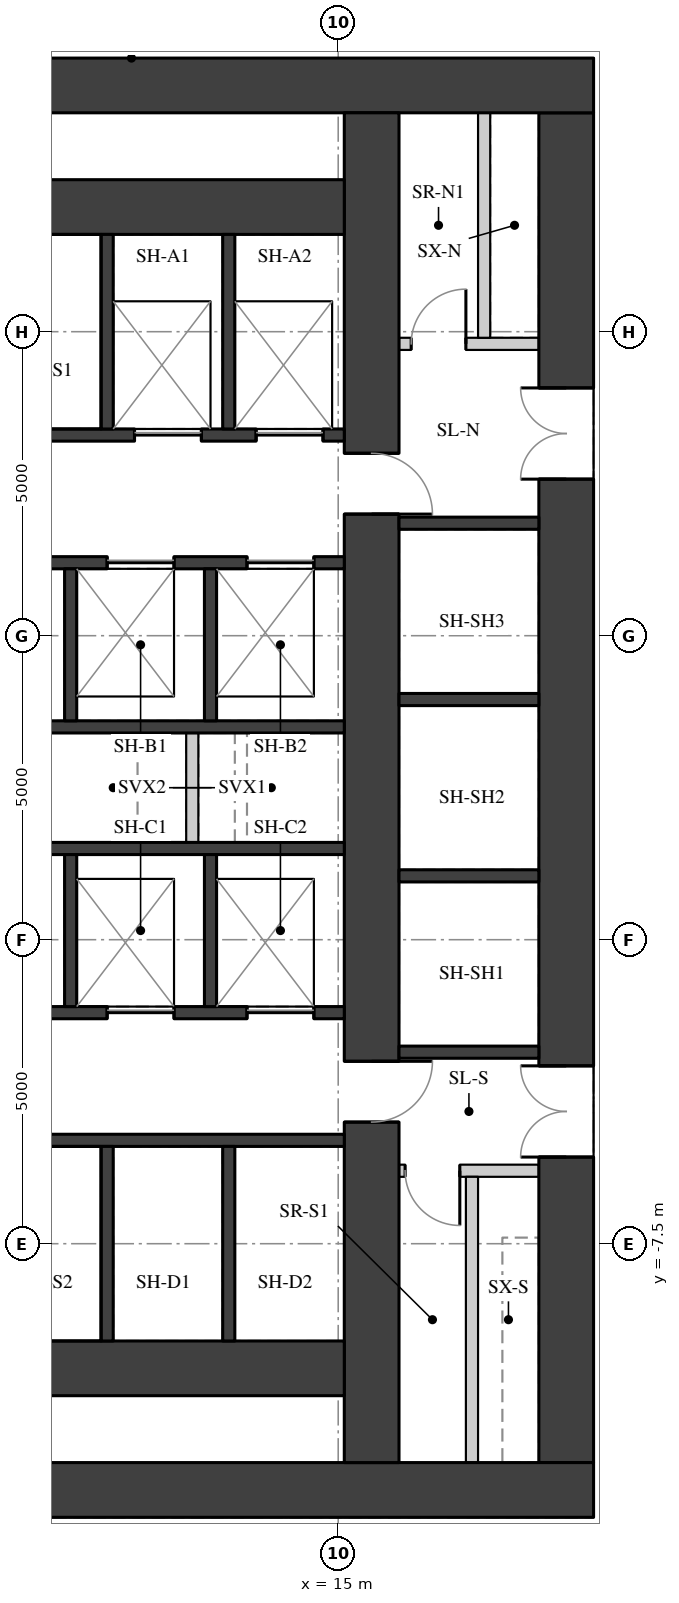
"""IFC4 building model, lengths in metres.
Left out: names, types, materials, properties, quantities, classifications, styles, units other than length and angle.
Written with IfcOpenShell. Run it as: python <this file> out.ifc"""

import sys

from ifc_helpers import new_model, si_unit, direction, frame, frame_2d, origin, place, context, subcontext, project, spatial, rectangle, extrude, element, fill, save


model = new_model("IFC4")
c1 = context("Model", 3, precision=1e-05, world=origin(), true_north=direction((0.0, 1.0)))
c2 = subcontext(c1, "Body", "Model", "MODEL_VIEW")
j1 = project(units=[si_unit("LENGTHUNIT", "METRE"), si_unit("PLANEANGLEUNIT", "RADIAN")], contexts=[c1])
p1 = place(None, origin())
s1 = spatial("IfcSite", under=j1, at=p1, CompositionType="ELEMENT")
p2 = place(p1, origin())
s2 = spatial("IfcBuilding", under=s1, at=p2, CompositionType="ELEMENT")
p3 = place(p2, frame((0.0, 0.0, 88.9)))
s3 = spatial("IfcBuildingStorey", under=s2, at=p3, CompositionType="ELEMENT", Elevation=88.9)
p4 = place(p3, frame((18.75, -11.1, 0.0), z_axis=(0.0, 0.0, 1.0), x_axis=(0.0, 1.0, 0.0)))
e1 = element("IfcWall", 1, at=p4, inside=s3, PredefinedType="SHEAR", context=c2, shape_type="SweptSolid", body=[
    extrude(rectangle(XDim=22.2, YDim=0.9, at=frame_2d((11.1, 0.0))), origin(), (0.0, 0.0, 1.0), 3.02),
])
p5 = place(p4, frame((16.175, 0.0, 0.0)))
e2 = element("IfcOpeningElement", 2, at=p5, cuts=e1, PredefinedType="OPENING", context=c2, shape_type="SweptSolid", body=[
    extrude(rectangle(XDim=1.5, YDim=2.1, at=frame_2d((0.75, 1.05))), frame((0.0, 0.46, 0.0), z_axis=(0.0, -1.0, 0.0), x_axis=(1.0, 0.0, 0.0)), (0.0, 0.0, 1.0), 0.92),
])
p6 = place(p4, frame((5.025, 0.0, 0.0)))
e3 = element("IfcOpeningElement", 3, at=p6, cuts=e1, PredefinedType="OPENING", context=c2, shape_type="SweptSolid", body=[
    extrude(rectangle(XDim=1.5, YDim=2.1, at=frame_2d((0.75, 1.05))), frame((0.0, 0.46, 0.0), z_axis=(0.0, -1.0, 0.0), x_axis=(1.0, 0.0, 0.0)), (0.0, 0.0, 1.0), 0.92),
])
for number, where, z_axis, x_axis in (
    (4, (4.0, 11.55, 0.0), (0.0, 0.0, 1.0), (1.0, 0.0, 0.0)),
    (5, (4.0, -11.55, 0.0), (0.0, 0.0, 1.0), (1.0, 0.0, 0.0)),
):
    element("IfcWall", number, at=place(p3, frame(where, z_axis=z_axis, x_axis=x_axis)), inside=s3, PredefinedType="SHEAR", context=c2, shape_type="SweptSolid", body=[
        extrude(rectangle(XDim=15.2, YDim=0.9, at=frame_2d((7.6, 0.0))), origin(), (0.0, 0.0, 1.0), 3.02),
    ])
p7 = place(p3, frame((15.55, -11.1, 0.0), z_axis=(0.0, 0.0, 1.0), x_axis=(0.0, 1.0, 0.0)))
e6 = element("IfcWall", 6, at=p7, inside=s3, PredefinedType="SHEAR", context=c2, shape_type="SweptSolid", body=[
    extrude(rectangle(XDim=22.2, YDim=0.9, at=frame_2d((11.1, 0.0))), origin(), (0.0, 0.0, 1.0), 3.02),
])
p8 = place(p7, frame((15.6, 0.0, 0.0)))
e7 = element("IfcOpeningElement", 7, at=p8, cuts=e6, PredefinedType="OPENING", context=c2, shape_type="SweptSolid", body=[
    extrude(rectangle(XDim=1.0, YDim=2.1, at=frame_2d((0.5, 1.05))), frame((0.0, 0.46, 0.0), z_axis=(0.0, -1.0, 0.0), x_axis=(1.0, 0.0, 0.0)), (0.0, 0.0, 1.0), 0.92),
])
p9 = place(p7, frame((5.6, 0.0, 0.0)))
e8 = element("IfcOpeningElement", 8, at=p9, cuts=e6, PredefinedType="OPENING", context=c2, shape_type="SweptSolid", body=[
    extrude(rectangle(XDim=1.0, YDim=2.1, at=frame_2d((0.5, 1.05))), frame((0.0, 0.46, 0.0), z_axis=(0.0, -1.0, 0.0), x_axis=(1.0, 0.0, 0.0)), (0.0, 0.0, 1.0), 0.92),
])
for number, where, z_axis, x_axis in (
    (9, (4.9, 9.55, 0.0), (0.0, 0.0, 1.0), (1.0, 0.0, 0.0)),
    (10, (4.9, -9.55, 0.0), (0.0, 0.0, 1.0), (1.0, 0.0, 0.0)),
):
    element("IfcWall", number, at=place(p3, frame(where, z_axis=z_axis, x_axis=x_axis)), inside=s3, PredefinedType="SHEAR", context=c2, shape_type="SweptSolid", body=[
        extrude(rectangle(XDim=10.2, YDim=0.9, at=frame_2d((5.1, 0.0))), origin(), (0.0, 0.0, 1.0), 3.02),
    ])
p10 = place(p3, frame((4.9, 5.8, 0.0), z_axis=(0.0, 0.0, 1.0), x_axis=(1.0, 0.0, 0.0)))
e11 = element("IfcWall", 11, at=p10, inside=s3, PredefinedType="SHEAR", context=c2, shape_type="SweptSolid", body=[
    extrude(rectangle(XDim=10.2, YDim=0.2, at=frame_2d((5.1, 0.0))), origin(), (0.0, 0.0, 1.0), 3.02),
])
p11 = place(p10, frame((6.75, 0.0, 0.0)))
e12 = element("IfcOpeningElement", 12, at=p11, cuts=e11, PredefinedType="OPENING", context=c2, shape_type="SweptSolid", body=[
    extrude(rectangle(XDim=1.1, YDim=2.1, at=frame_2d((0.55, 1.05))), frame((0.0, 0.11, 0.0), z_axis=(0.0, -1.0, 0.0), x_axis=(1.0, 0.0, 0.0)), (0.0, 0.0, 1.0), 0.22),
])
p12 = place(p10, frame((8.75, 0.0, 0.0)))
e13 = element("IfcOpeningElement", 13, at=p12, cuts=e11, PredefinedType="OPENING", context=c2, shape_type="SweptSolid", body=[
    extrude(rectangle(XDim=1.1, YDim=2.1, at=frame_2d((0.55, 1.05))), frame((0.0, 0.11, 0.0), z_axis=(0.0, -1.0, 0.0), x_axis=(1.0, 0.0, 0.0)), (0.0, 0.0, 1.0), 0.22),
])
p13 = place(p3, frame((4.9, 3.7, 0.0), z_axis=(0.0, 0.0, 1.0), x_axis=(1.0, 0.0, 0.0)))
e14 = element("IfcWall", 14, at=p13, inside=s3, PredefinedType="SHEAR", context=c2, shape_type="SweptSolid", body=[
    extrude(rectangle(XDim=10.2, YDim=0.2, at=frame_2d((5.1, 0.0))), origin(), (0.0, 0.0, 1.0), 3.02),
])
p14 = place(p13, frame((6.3, 0.0, 0.0)))
e15 = element("IfcOpeningElement", 15, at=p14, cuts=e14, PredefinedType="OPENING", context=c2, shape_type="SweptSolid", body=[
    extrude(rectangle(XDim=1.1, YDim=2.1, at=frame_2d((0.55, 1.05))), frame((0.0, 0.11, 0.0), z_axis=(0.0, -1.0, 0.0), x_axis=(1.0, 0.0, 0.0)), (0.0, 0.0, 1.0), 0.22),
])
p15 = place(p13, frame((8.6, 0.0, 0.0)))
e16 = element("IfcOpeningElement", 16, at=p15, cuts=e14, PredefinedType="OPENING", context=c2, shape_type="SweptSolid", body=[
    extrude(rectangle(XDim=1.1, YDim=2.1, at=frame_2d((0.55, 1.05))), frame((0.0, 0.11, 0.0), z_axis=(0.0, -1.0, 0.0), x_axis=(1.0, 0.0, 0.0)), (0.0, 0.0, 1.0), 0.22),
])
for number, where, z_axis, x_axis in (
    (17, (4.9, 1.0, 0.0), (0.0, 0.0, 1.0), (1.0, 0.0, 0.0)),
    (18, (4.9, -1.0, 0.0), (0.0, 0.0, 1.0), (1.0, 0.0, 0.0)),
):
    element("IfcWall", number, at=place(p3, frame(where, z_axis=z_axis, x_axis=x_axis)), inside=s3, PredefinedType="SHEAR", context=c2, shape_type="SweptSolid", body=[
        extrude(rectangle(XDim=10.2, YDim=0.2, at=frame_2d((5.1, 0.0))), origin(), (0.0, 0.0, 1.0), 3.02),
    ])
p16 = place(p3, frame((4.9, -3.7, 0.0), z_axis=(0.0, 0.0, 1.0), x_axis=(1.0, 0.0, 0.0)))
e19 = element("IfcWall", 19, at=p16, inside=s3, PredefinedType="SHEAR", context=c2, shape_type="SweptSolid", body=[
    extrude(rectangle(XDim=10.2, YDim=0.2, at=frame_2d((5.1, 0.0))), origin(), (0.0, 0.0, 1.0), 3.02),
])
p17 = place(p16, frame((6.3, 0.0, 0.0)))
e20 = element("IfcOpeningElement", 20, at=p17, cuts=e19, PredefinedType="OPENING", context=c2, shape_type="SweptSolid", body=[
    extrude(rectangle(XDim=1.1, YDim=2.1, at=frame_2d((0.55, 1.05))), frame((0.0, 0.11, 0.0), z_axis=(0.0, -1.0, 0.0), x_axis=(1.0, 0.0, 0.0)), (0.0, 0.0, 1.0), 0.22),
])
p18 = place(p16, frame((8.6, 0.0, 0.0)))
e21 = element("IfcOpeningElement", 21, at=p18, cuts=e19, PredefinedType="OPENING", context=c2, shape_type="SweptSolid", body=[
    extrude(rectangle(XDim=1.1, YDim=2.1, at=frame_2d((0.55, 1.05))), frame((0.0, 0.11, 0.0), z_axis=(0.0, -1.0, 0.0), x_axis=(1.0, 0.0, 0.0)), (0.0, 0.0, 1.0), 0.22),
])
p19 = place(p3, frame((4.9, -5.8, 0.0), z_axis=(0.0, 0.0, 1.0), x_axis=(1.0, 0.0, 0.0)))
e22 = element("IfcWall", 22, at=p19, inside=s3, PredefinedType="SHEAR", context=c2, shape_type="SweptSolid", body=[
    extrude(rectangle(XDim=10.2, YDim=0.2, at=frame_2d((5.1, 0.0))), origin(), (0.0, 0.0, 1.0), 3.02),
])
for number, where, z_axis, x_axis in (
    (23, (11.2, 5.9, 0.0), (0.0, 0.0, 1.0), (0.0, 1.0, 0.0)),
    (24, (11.2, -9.1, 0.0), (0.0, 0.0, 1.0), (0.0, 1.0, 0.0)),
    (25, (13.2, 5.9, 0.0), (0.0, 0.0, 1.0), (0.0, 1.0, 0.0)),
    (26, (13.2, -9.1, 0.0), (0.0, 0.0, 1.0), (0.0, 1.0, 0.0)),
):
    element("IfcWall", number, at=place(p3, frame(where, z_axis=z_axis, x_axis=x_axis)), inside=s3, PredefinedType="SHEAR", context=c2, shape_type="SweptSolid", body=[
        extrude(rectangle(XDim=3.2, YDim=0.2, at=frame_2d((1.6, 0.0))), origin(), (0.0, 0.0, 1.0), 3.02),
    ])
for number, where, z_axis, x_axis in (
    (27, (10.6, 1.1, 0.0), (0.0, 0.0, 1.0), (0.0, 1.0, 0.0)),
    (28, (10.6, -3.6, 0.0), (0.0, 0.0, 1.0), (0.0, 1.0, 0.0)),
    (29, (12.9, 1.1, 0.0), (0.0, 0.0, 1.0), (0.0, 1.0, 0.0)),
    (30, (12.9, -3.6, 0.0), (0.0, 0.0, 1.0), (0.0, 1.0, 0.0)),
):
    element("IfcWall", number, at=place(p3, frame(where, z_axis=z_axis, x_axis=x_axis)), inside=s3, PredefinedType="SHEAR", context=c2, shape_type="SweptSolid", body=[
        extrude(rectangle(XDim=2.5, YDim=0.2, at=frame_2d((1.25, 0.0))), origin(), (0.0, 0.0, 1.0), 3.02),
    ])
p20 = place(p3, frame((12.6, -0.9, 0.0), z_axis=(0.0, 0.0, 1.0), x_axis=(0.0, 1.0, 0.0)))
e31 = element("IfcWall", 31, at=p20, inside=s3, PredefinedType="PARTITIONING", context=c2, shape_type="SweptSolid", body=[
    extrude(rectangle(XDim=1.8, YDim=0.2, at=frame_2d((0.9, 0.0))), origin(), (0.0, 0.0, 1.0), 3.02),
])
for number, where, z_axis, x_axis in (
    (32, (16.0, -4.35, 0.0), (0.0, 0.0, 1.0), (1.0, 0.0, 0.0)),
    (33, (16.0, -1.45, 0.0), (0.0, 0.0, 1.0), (1.0, 0.0, 0.0)),
    (34, (16.0, 1.45, 0.0), (0.0, 0.0, 1.0), (1.0, 0.0, 0.0)),
    (35, (16.0, 4.35, 0.0), (0.0, 0.0, 1.0), (1.0, 0.0, 0.0)),
):
    element("IfcWall", number, at=place(p3, frame(where, z_axis=z_axis, x_axis=x_axis)), inside=s3, PredefinedType="SHEAR", context=c2, shape_type="SweptSolid", body=[
        extrude(rectangle(XDim=2.3, YDim=0.2, at=frame_2d((1.15, 0.0))), origin(), (0.0, 0.0, 1.0), 3.02),
    ])
p21 = place(p3, frame((16.0, 7.3, 0.0), z_axis=(0.0, 0.0, 1.0), x_axis=(1.0, 0.0, 0.0)))
e36 = element("IfcWall", 36, at=p21, inside=s3, PredefinedType="PARTITIONING", context=c2, shape_type="SweptSolid", body=[
    extrude(rectangle(XDim=2.3, YDim=0.2, at=frame_2d((1.15, 0.0))), origin(), (0.0, 0.0, 1.0), 3.02),
])
p22 = place(p21, frame((0.2, 0.0, 0.0)))
e37 = element("IfcOpeningElement", 37, at=p22, cuts=e36, PredefinedType="OPENING", context=c2, shape_type="SweptSolid", body=[
    extrude(rectangle(XDim=0.9, YDim=2.1, at=frame_2d((0.45, 1.05))), frame((0.0, 0.11, 0.0), z_axis=(0.0, -1.0, 0.0), x_axis=(1.0, 0.0, 0.0)), (0.0, 0.0, 1.0), 0.22),
])
p23 = place(p3, frame((17.4, 7.4, 0.0), z_axis=(0.0, 0.0, 1.0), x_axis=(0.0, 1.0, 0.0)))
e38 = element("IfcWall", 38, at=p23, inside=s3, PredefinedType="PARTITIONING", context=c2, shape_type="SweptSolid", body=[
    extrude(rectangle(XDim=3.7, YDim=0.2, at=frame_2d((1.85, 0.0))), origin(), (0.0, 0.0, 1.0), 3.02),
])
p24 = place(p3, frame((16.0, -6.3, 0.0), z_axis=(0.0, 0.0, 1.0), x_axis=(1.0, 0.0, 0.0)))
e39 = element("IfcWall", 39, at=p24, inside=s3, PredefinedType="PARTITIONING", context=c2, shape_type="SweptSolid", body=[
    extrude(rectangle(XDim=2.3, YDim=0.2, at=frame_2d((1.15, 0.0))), origin(), (0.0, 0.0, 1.0), 3.02),
])
p25 = place(p24, frame((0.1, 0.0, 0.0)))
e40 = element("IfcOpeningElement", 40, at=p25, cuts=e39, PredefinedType="OPENING", context=c2, shape_type="SweptSolid", body=[
    extrude(rectangle(XDim=0.9, YDim=2.1, at=frame_2d((0.45, 1.05))), frame((0.0, 0.11, 0.0), z_axis=(0.0, -1.0, 0.0), x_axis=(1.0, 0.0, 0.0)), (0.0, 0.0, 1.0), 0.22),
])
p26 = place(p3, frame((17.2, -11.1, 0.0), z_axis=(0.0, 0.0, 1.0), x_axis=(0.0, 1.0, 0.0)))
e41 = element("IfcWall", 41, at=p26, inside=s3, PredefinedType="PARTITIONING", context=c2, shape_type="SweptSolid", body=[
    extrude(rectangle(XDim=4.7, YDim=0.2, at=frame_2d((2.35, 0.0))), origin(), (0.0, 0.0, 1.0), 3.02),
])
p27 = place(p5, origin())
e42 = element("IfcDoor", 42, at=p27, inside=s3, OperationType="DOUBLE_DOOR_SINGLE_SWING", PredefinedType="DOOR", context=c2, shape_type="SweptSolid", body=[
    extrude(rectangle(XDim=1.5, YDim=2.1, at=frame_2d((0.75, 1.05))), frame((0.0, 0.025, 0.0), z_axis=(0.0, -1.0, 0.0), x_axis=(1.0, 0.0, 0.0)), (0.0, 0.0, 1.0), 0.05),
])
fill(e2, e42)
p28 = place(p6, origin())
e43 = element("IfcDoor", 43, at=p28, inside=s3, OperationType="DOUBLE_DOOR_SINGLE_SWING", PredefinedType="DOOR", context=c2, shape_type="SweptSolid", body=[
    extrude(rectangle(XDim=1.5, YDim=2.1, at=frame_2d((0.75, 1.05))), frame((0.0, 0.025, 0.0), z_axis=(0.0, -1.0, 0.0), x_axis=(1.0, 0.0, 0.0)), (0.0, 0.0, 1.0), 0.05),
])
fill(e3, e43)
p29 = place(p11, origin())
e44 = element("IfcDoor", 44, at=p29, inside=s3, OperationType="DOUBLE_DOOR_SLIDING", PredefinedType="DOOR", context=c2, shape_type="SweptSolid", body=[
    extrude(rectangle(XDim=1.1, YDim=2.1, at=frame_2d((0.55, 1.05))), frame((0.0, 0.025, 0.0), z_axis=(0.0, -1.0, 0.0), x_axis=(1.0, 0.0, 0.0)), (0.0, 0.0, 1.0), 0.05),
])
fill(e12, e44)
p30 = place(p12, origin())
e45 = element("IfcDoor", 45, at=p30, inside=s3, OperationType="DOUBLE_DOOR_SLIDING", PredefinedType="DOOR", context=c2, shape_type="SweptSolid", body=[
    extrude(rectangle(XDim=1.1, YDim=2.1, at=frame_2d((0.55, 1.05))), frame((0.0, 0.025, 0.0), z_axis=(0.0, -1.0, 0.0), x_axis=(1.0, 0.0, 0.0)), (0.0, 0.0, 1.0), 0.05),
])
fill(e13, e45)
p31 = place(p14, origin())
e46 = element("IfcDoor", 46, at=p31, inside=s3, OperationType="DOUBLE_DOOR_SLIDING", PredefinedType="DOOR", context=c2, shape_type="SweptSolid", body=[
    extrude(rectangle(XDim=1.1, YDim=2.1, at=frame_2d((0.55, 1.05))), frame((0.0, 0.025, 0.0), z_axis=(0.0, -1.0, 0.0), x_axis=(1.0, 0.0, 0.0)), (0.0, 0.0, 1.0), 0.05),
])
fill(e15, e46)
p32 = place(p15, origin())
e47 = element("IfcDoor", 47, at=p32, inside=s3, OperationType="DOUBLE_DOOR_SLIDING", PredefinedType="DOOR", context=c2, shape_type="SweptSolid", body=[
    extrude(rectangle(XDim=1.1, YDim=2.1, at=frame_2d((0.55, 1.05))), frame((0.0, 0.025, 0.0), z_axis=(0.0, -1.0, 0.0), x_axis=(1.0, 0.0, 0.0)), (0.0, 0.0, 1.0), 0.05),
])
fill(e16, e47)
p33 = place(p17, origin())
e48 = element("IfcDoor", 48, at=p33, inside=s3, OperationType="DOUBLE_DOOR_SLIDING", PredefinedType="DOOR", context=c2, shape_type="SweptSolid", body=[
    extrude(rectangle(XDim=1.1, YDim=2.1, at=frame_2d((0.55, 1.05))), frame((0.0, 0.025, 0.0), z_axis=(0.0, -1.0, 0.0), x_axis=(1.0, 0.0, 0.0)), (0.0, 0.0, 1.0), 0.05),
])
fill(e20, e48)
p34 = place(p18, origin())
e49 = element("IfcDoor", 49, at=p34, inside=s3, OperationType="DOUBLE_DOOR_SLIDING", PredefinedType="DOOR", context=c2, shape_type="SweptSolid", body=[
    extrude(rectangle(XDim=1.1, YDim=2.1, at=frame_2d((0.55, 1.05))), frame((0.0, 0.025, 0.0), z_axis=(0.0, -1.0, 0.0), x_axis=(1.0, 0.0, 0.0)), (0.0, 0.0, 1.0), 0.05),
])
fill(e21, e49)
p35 = place(p8, origin())
e50 = element("IfcDoor", 50, at=p35, inside=s3, OperationType="SINGLE_SWING_RIGHT", PredefinedType="DOOR", context=c2, shape_type="SweptSolid", body=[
    extrude(rectangle(XDim=1.0, YDim=2.1, at=frame_2d((0.5, 1.05))), frame((0.0, 0.025, 0.0), z_axis=(0.0, -1.0, 0.0), x_axis=(1.0, 0.0, 0.0)), (0.0, 0.0, 1.0), 0.05),
])
fill(e7, e50)
p36 = place(p22, origin())
e51 = element("IfcDoor", 51, at=p36, inside=s3, OperationType="SINGLE_SWING_RIGHT", PredefinedType="DOOR", context=c2, shape_type="SweptSolid", body=[
    extrude(rectangle(XDim=0.9, YDim=2.1, at=frame_2d((0.45, 1.05))), frame((0.0, 0.025, 0.0), z_axis=(0.0, -1.0, 0.0), x_axis=(1.0, 0.0, 0.0)), (0.0, 0.0, 1.0), 0.05),
])
fill(e37, e51)
p37 = place(p9, origin())
e52 = element("IfcDoor", 52, at=p37, inside=s3, OperationType="SINGLE_SWING_LEFT", PredefinedType="DOOR", context=c2, shape_type="SweptSolid", body=[
    extrude(rectangle(XDim=1.0, YDim=2.1, at=frame_2d((0.5, 1.05))), frame((0.0, 0.025, 0.0), z_axis=(0.0, -1.0, 0.0), x_axis=(1.0, 0.0, 0.0)), (0.0, 0.0, 1.0), 0.05),
])
fill(e8, e52)
p38 = place(p25, origin())
e53 = element("IfcDoor", 53, at=p38, inside=s3, OperationType="SINGLE_SWING_LEFT", PredefinedType="DOOR", context=c2, shape_type="SweptSolid", body=[
    extrude(rectangle(XDim=0.9, YDim=2.1, at=frame_2d((0.45, 1.05))), frame((0.0, 0.025, 0.0), z_axis=(0.0, -1.0, 0.0), x_axis=(1.0, 0.0, 0.0)), (0.0, 0.0, 1.0), 0.05),
])
fill(e40, e53)
save(model, sys.argv[1])
